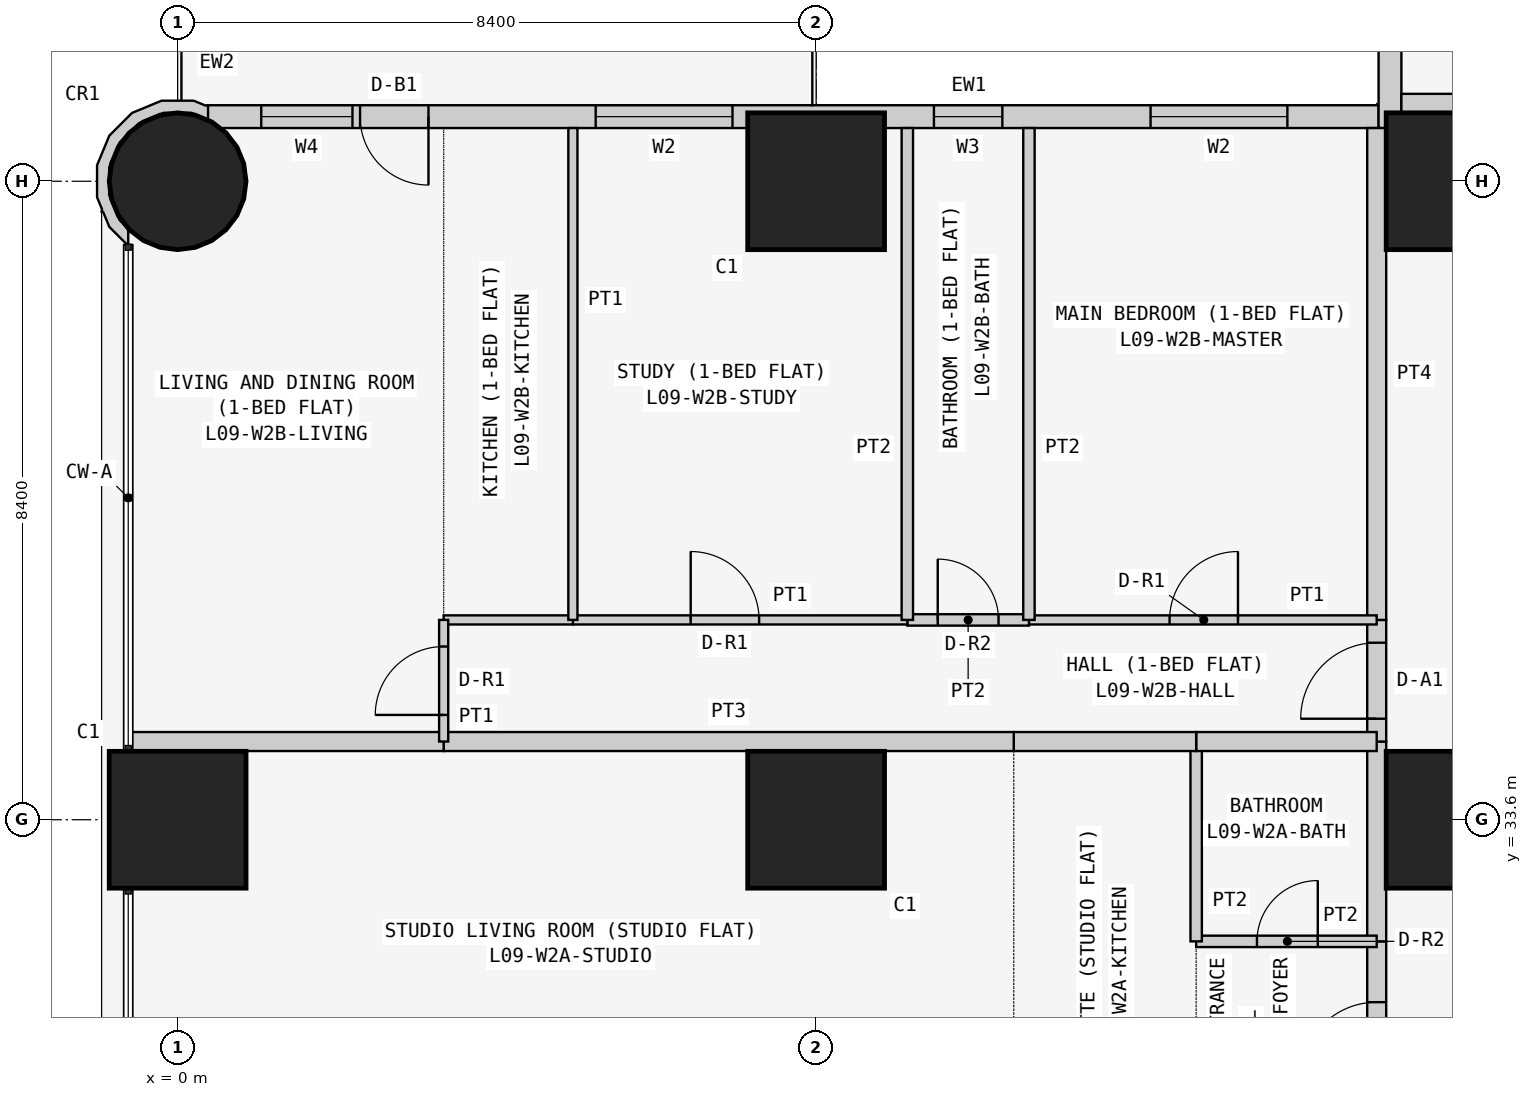
"""IFC4 building model, lengths in metres.
Left out: names, types, materials, properties, quantities, classifications, styles, units other than length and angle.
Written with IfcOpenShell. Run it as: python <this file> out.ifc"""

import sys

from ifc_helpers import new_model, si_unit, direction, frame, frame_2d, origin, origin_2d, place, context, subcontext, project, spatial, polyline, rectangle, circle, outline, extrude, element, fill, save


model = new_model("IFC4")
c1 = context("Model", 3, precision=1e-05, world=origin(), true_north=direction((0.0, 1.0)))
c2 = subcontext(c1, "Body", "Model", "MODEL_VIEW")
j1 = project(units=[si_unit("LENGTHUNIT", "METRE"), si_unit("PLANEANGLEUNIT", "RADIAN")], contexts=[c1])
p1 = place(None, origin())
s1 = spatial("IfcSite", under=j1, at=p1, CompositionType="ELEMENT")
p2 = place(p1, origin())
s2 = spatial("IfcBuilding", under=s1, at=p2, CompositionType="ELEMENT")
p3 = place(p2, frame((0.0, 0.0, 41.7)))
s3 = spatial("IfcBuildingStorey", under=s2, at=p3, CompositionType="ELEMENT", Elevation=41.7)
p4 = place(p3, frame((0.0, 33.6, 0.0), z_axis=(0.0, 0.0, 1.0), x_axis=(1.0, 0.0, 0.0)))
e1 = element("IfcColumn", 1, at=p4, inside=s3, PredefinedType="COLUMN", context=c2, shape_type="SweptSolid", body=[
    extrude(rectangle(XDim=1.8, YDim=1.8, at=origin_2d()), origin(), (0.0, 0.0, 1.0), 3.6),
])
p5 = place(p3, frame((0.0, 42.0, 0.0), z_axis=(0.0, 0.0, 1.0), x_axis=(1.0, 0.0, 0.0)))
e2 = element("IfcColumn", 2, at=p5, inside=s3, PredefinedType="COLUMN", context=c2, shape_type="SweptSolid", body=[
    extrude(circle(Radius=0.9, at=origin_2d()), origin(), (0.0, 0.0, 1.0), 3.6),
])
for number, where, z_axis, x_axis in (
    (3, (8.4, 33.6, 0.0), (0.0, 0.0, 1.0), (1.0, 0.0, 0.0)),
    (4, (8.4, 42.0, 0.0), (0.0, 0.0, 1.0), (1.0, 0.0, 0.0)),
    (5, (16.8, 33.6, 0.0), (0.0, 0.0, 1.0), (1.0, 0.0, 0.0)),
    (6, (16.8, 42.0, 0.0), (0.0, 0.0, 1.0), (1.0, 0.0, 0.0)),
):
    element("IfcColumn", number, at=place(p3, frame(where, z_axis=z_axis, x_axis=x_axis)), inside=s3, PredefinedType="COLUMN", context=c2, shape_type="SweptSolid", body=[
        extrude(rectangle(XDim=1.8, YDim=1.8, at=origin_2d()), origin(), (0.0, 0.0, 1.0), 3.6),
    ])
p6 = place(p3, frame((15.8, 42.85, 0.0), z_axis=(0.0, 0.0, 1.0), x_axis=(-1.0, 0.0, 0.0)))
e7 = element("IfcWall", 7, at=p6, inside=s3, PredefinedType="SOLIDWALL", context=c2, shape_type="SweptSolid", body=[
    extrude(rectangle(XDim=15.4, YDim=0.3, at=frame_2d((7.7, 0.0))), origin(), (0.0, 0.0, 1.0), 3.45),
])
p7 = place(p6, frame((1.2, 0.0, 0.9)))
e8 = element("IfcOpeningElement", 8, at=p7, cuts=e7, PredefinedType="OPENING", context=c2, shape_type="SweptSolid", body=[
    extrude(rectangle(XDim=1.8, YDim=1.5, at=frame_2d((0.9, 0.75))), frame((0.0, 0.16, 0.0), z_axis=(0.0, -1.0, 0.0), x_axis=(1.0, 0.0, 0.0)), (0.0, 0.0, 1.0), 0.32),
])
p8 = place(p6, frame((4.95, 0.0, 1.5)))
e9 = element("IfcOpeningElement", 9, at=p8, cuts=e7, PredefinedType="OPENING", context=c2, shape_type="SweptSolid", body=[
    extrude(rectangle(XDim=0.9, YDim=0.7, at=frame_2d((0.45, 0.35))), frame((0.0, 0.16, 0.0), z_axis=(0.0, -1.0, 0.0), x_axis=(1.0, 0.0, 0.0)), (0.0, 0.0, 1.0), 0.32),
])
p9 = place(p6, frame((8.5, 0.0, 0.9)))
e10 = element("IfcOpeningElement", 10, at=p9, cuts=e7, PredefinedType="OPENING", context=c2, shape_type="SweptSolid", body=[
    extrude(rectangle(XDim=1.8, YDim=1.5, at=frame_2d((0.9, 0.75))), frame((0.0, 0.16, 0.0), z_axis=(0.0, -1.0, 0.0), x_axis=(1.0, 0.0, 0.0)), (0.0, 0.0, 1.0), 0.32),
])
p10 = place(p6, frame((12.5, 0.0, 0.0)))
e11 = element("IfcOpeningElement", 11, at=p10, cuts=e7, PredefinedType="OPENING", context=c2, shape_type="SweptSolid", body=[
    extrude(rectangle(XDim=0.9, YDim=2.4, at=frame_2d((0.45, 1.2))), frame((0.0, 0.16, 0.0), z_axis=(0.0, -1.0, 0.0), x_axis=(1.0, 0.0, 0.0)), (0.0, 0.0, 1.0), 0.32),
])
p11 = place(p6, frame((13.5, 0.0, 0.9)))
e12 = element("IfcOpeningElement", 12, at=p11, cuts=e7, PredefinedType="OPENING", context=c2, shape_type="SweptSolid", body=[
    extrude(rectangle(XDim=1.2, YDim=1.5, at=frame_2d((0.6, 0.75))), frame((0.0, 0.16, 0.0), z_axis=(0.0, -1.0, 0.0), x_axis=(1.0, 0.0, 0.0)), (0.0, 0.0, 1.0), 0.32),
])
p12 = place(p3, frame((15.95, 58.4, 0.0), z_axis=(0.0, 0.0, 1.0), x_axis=(0.0, -1.0, 0.0)))
e13 = element("IfcWall", 13, at=p12, inside=s3, PredefinedType="SOLIDWALL", context=c2, shape_type="SweptSolid", body=[
    extrude(rectangle(XDim=15.7, YDim=0.3, at=frame_2d((7.85, 0.0))), origin(), (0.0, 0.0, 1.0), 3.45),
])
p13 = place(p12, frame((12.4, 0.0, 0.9)))
e14 = element("IfcOpeningElement", 14, at=p13, cuts=e13, PredefinedType="OPENING", context=c2, shape_type="SweptSolid", body=[
    extrude(rectangle(XDim=1.8, YDim=1.5, at=frame_2d((0.9, 0.75))), frame((0.0, 0.16, 0.0), z_axis=(0.0, -1.0, 0.0), x_axis=(1.0, 0.0, 0.0)), (0.0, 0.0, 1.0), 0.32),
])
p14 = place(p12, frame((9.55, 0.0, 1.5)))
e15 = element("IfcOpeningElement", 15, at=p14, cuts=e13, PredefinedType="OPENING", context=c2, shape_type="SweptSolid", body=[
    extrude(rectangle(XDim=0.9, YDim=0.7, at=frame_2d((0.45, 0.35))), frame((0.0, 0.16, 0.0), z_axis=(0.0, -1.0, 0.0), x_axis=(1.0, 0.0, 0.0)), (0.0, 0.0, 1.0), 0.32),
])
p15 = place(p12, frame((5.1, 0.0, 0.9)))
e16 = element("IfcOpeningElement", 16, at=p15, cuts=e13, PredefinedType="OPENING", context=c2, shape_type="SweptSolid", body=[
    extrude(rectangle(XDim=1.8, YDim=1.5, at=frame_2d((0.9, 0.75))), frame((0.0, 0.16, 0.0), z_axis=(0.0, -1.0, 0.0), x_axis=(1.0, 0.0, 0.0)), (0.0, 0.0, 1.0), 0.32),
])
p16 = place(p12, frame((2.0, 0.0, 0.0)))
e17 = element("IfcOpeningElement", 17, at=p16, cuts=e13, PredefinedType="OPENING", context=c2, shape_type="SweptSolid", body=[
    extrude(rectangle(XDim=0.9, YDim=2.4, at=frame_2d((0.45, 1.2))), frame((0.0, 0.16, 0.0), z_axis=(0.0, -1.0, 0.0), x_axis=(1.0, 0.0, 0.0)), (0.0, 0.0, 1.0), 0.32),
])
p17 = place(p12, frame((0.7, 0.0, 0.9)))
e18 = element("IfcOpeningElement", 18, at=p17, cuts=e13, PredefinedType="OPENING", context=c2, shape_type="SweptSolid", body=[
    extrude(rectangle(XDim=1.2, YDim=1.5, at=frame_2d((0.6, 0.75))), frame((0.0, 0.16, 0.0), z_axis=(0.0, -1.0, 0.0), x_axis=(1.0, 0.0, 0.0)), (0.0, 0.0, 1.0), 0.32),
])
p18 = place(p3, frame((0.364, 42.91, 0.0), z_axis=(0.0, 0.0, 1.0), x_axis=(-0.926129809145, 0.377204953059, 0.0)))
e19 = element("IfcWall", 19, at=p18, inside=s3, PredefinedType="SOLIDWALL", context=c2, shape_type="SweptSolid", body=[
    extrude(outline(polyline([(0.36, 1.803), (0.509, 1.741), (0.761, 1.486), (0.896, 1.154), (0.894, 0.795), (0.755, 0.465), (0.5, 0.213), (0.168, 0.078), (-0.1, 0.08), (0.001, -0.097), (0.03, -0.08), (0.199, -0.081), (0.589, 0.078), (0.889, 0.374), (1.053, 0.763), (1.055, 1.185), (0.896, 1.575), (0.778, 1.695), (0.769, 1.728), (0.75, 1.723), (0.6, 1.875), (0.295, 2.003), (0.281, 1.998), (0.36, 1.803)])), origin(), (0.0, 0.0, 1.0), 3.45),
])
p19 = place(p3, frame((16.1, 43.025, 0.0), z_axis=(0.0, 0.0, 1.0), x_axis=(1.0, 0.0, 0.0)))
e20 = element("IfcWall", 20, at=p19, inside=s3, PredefinedType="PARTITIONING", context=c2, shape_type="SweptSolid", body=[
    extrude(rectangle(XDim=6.871, YDim=0.25, at=frame_2d((3.436, 0.0))), origin(), (0.0, 0.0, 1.0), 3.45),
])
p20 = place(p3, frame((15.775, 29.4, 0.0), z_axis=(0.0, 0.0, 1.0), x_axis=(0.0, 1.0, 0.0)))
e21 = element("IfcWall", 21, at=p20, inside=s3, PredefinedType="PARTITIONING", context=c2, shape_type="SweptSolid", body=[
    extrude(rectangle(XDim=2.6, YDim=0.25, at=frame_2d((1.3, 0.0))), origin(), (0.0, 0.0, 1.0), 3.45),
])
p21 = place(p20, frame((0.8, 0.0, 0.0)))
e22 = element("IfcOpeningElement", 22, at=p21, cuts=e21, PredefinedType="OPENING", context=c2, shape_type="SweptSolid", body=[
    extrude(rectangle(XDim=1.0, YDim=2.1, at=frame_2d((0.5, 1.05))), frame((0.0, 0.135, 0.0), z_axis=(0.0, -1.0, 0.0), x_axis=(1.0, 0.0, 0.0)), (0.0, 0.0, 1.0), 0.27),
])
p22 = place(p3, frame((15.775, 32.0, 0.0), z_axis=(0.0, 0.0, 1.0), x_axis=(0.0, 1.0, 0.0)))
e23 = element("IfcWall", 23, at=p22, inside=s3, PredefinedType="PARTITIONING", context=c2, shape_type="SweptSolid", body=[
    extrude(rectangle(XDim=2.629, YDim=0.25, at=frame_2d((1.314, 0.0))), origin(), (0.0, 0.0, 1.0), 3.45),
])
p23 = place(p3, frame((15.775, 34.629, 0.0), z_axis=(0.0, 0.0, 1.0), x_axis=(0.0, 1.0, 0.0)))
e24 = element("IfcWall", 24, at=p23, inside=s3, PredefinedType="PARTITIONING", context=c2, shape_type="SweptSolid", body=[
    extrude(rectangle(XDim=1.6, YDim=0.25, at=frame_2d((0.8, 0.0))), origin(), (0.0, 0.0, 1.0), 3.45),
])
p24 = place(p23, frame((0.3, 0.0, 0.0)))
e25 = element("IfcOpeningElement", 25, at=p24, cuts=e24, PredefinedType="OPENING", context=c2, shape_type="SweptSolid", body=[
    extrude(rectangle(XDim=1.0, YDim=2.1, at=frame_2d((0.5, 1.05))), frame((0.0, 0.135, 0.0), z_axis=(0.0, -1.0, 0.0), x_axis=(1.0, 0.0, 0.0)), (0.0, 0.0, 1.0), 0.27),
])
p25 = place(p3, frame((15.775, 36.229, 0.0), z_axis=(0.0, 0.0, 1.0), x_axis=(0.0, 1.0, 0.0)))
e26 = element("IfcWall", 26, at=p25, inside=s3, PredefinedType="PARTITIONING", context=c2, shape_type="SweptSolid", body=[
    extrude(rectangle(XDim=6.471, YDim=0.25, at=frame_2d((3.235, 0.0))), origin(), (0.0, 0.0, 1.0), 3.45),
])
p26 = place(p3, frame((13.4, 32.0, 0.0), z_axis=(0.0, 0.0, 1.0), x_axis=(1.0, 0.0, 0.0)))
e27 = element("IfcWall", 27, at=p26, inside=s3, PredefinedType="PARTITIONING", context=c2, shape_type="SweptSolid", body=[
    extrude(rectangle(XDim=2.375, YDim=0.15, at=frame_2d((1.188, 0.0))), origin(), (0.0, 0.0, 1.0), 3.45),
])
p27 = place(p26, frame((0.8, 0.0, 0.0)))
e28 = element("IfcOpeningElement", 28, at=p27, cuts=e27, PredefinedType="OPENING", context=c2, shape_type="SweptSolid", body=[
    extrude(rectangle(XDim=0.8, YDim=2.1, at=frame_2d((0.4, 1.05))), frame((0.0, 0.085, 0.0), z_axis=(0.0, -1.0, 0.0), x_axis=(1.0, 0.0, 0.0)), (0.0, 0.0, 1.0), 0.17),
])
p28 = place(p3, frame((13.4, 32.0, 0.0), z_axis=(0.0, 0.0, 1.0), x_axis=(0.0, 1.0, 0.0)))
e29 = element("IfcWall", 29, at=p28, inside=s3, PredefinedType="PARTITIONING", context=c2, shape_type="SweptSolid", body=[
    extrude(rectangle(XDim=2.629, YDim=0.15, at=frame_2d((1.314, 0.0))), origin(), (0.0, 0.0, 1.0), 3.45),
])
p29 = place(p3, frame((13.4, 34.629, 0.0), z_axis=(0.0, 0.0, 1.0), x_axis=(1.0, 0.0, 0.0)))
e30 = element("IfcWall", 30, at=p29, inside=s3, PredefinedType="PARTITIONING", context=c2, shape_type="SweptSolid", body=[
    extrude(rectangle(XDim=2.375, YDim=0.25, at=frame_2d((1.188, 0.0))), origin(), (0.0, 0.0, 1.0), 3.45),
])
p30 = place(p3, frame((11.0, 34.629, 0.0), z_axis=(0.0, 0.0, 1.0), x_axis=(1.0, 0.0, 0.0)))
e31 = element("IfcWall", 31, at=p30, inside=s3, PredefinedType="PARTITIONING", context=c2, shape_type="SweptSolid", body=[
    extrude(rectangle(XDim=2.4, YDim=0.25, at=frame_2d((1.2, 0.0))), origin(), (0.0, 0.0, 1.0), 3.45),
])
p31 = place(p3, frame((3.5, 34.629, 0.0), z_axis=(0.0, 0.0, 1.0), x_axis=(1.0, 0.0, 0.0)))
e32 = element("IfcWall", 32, at=p31, inside=s3, PredefinedType="PARTITIONING", context=c2, shape_type="SweptSolid", body=[
    extrude(rectangle(XDim=7.5, YDim=0.25, at=frame_2d((3.75, 0.0))), origin(), (0.0, 0.0, 1.0), 3.45),
])
p32 = place(p3, frame((-0.65, 34.629, 0.0), z_axis=(0.0, 0.0, 1.0), x_axis=(1.0, 0.0, 0.0)))
e33 = element("IfcWall", 33, at=p32, inside=s3, PredefinedType="PARTITIONING", context=c2, shape_type="SweptSolid", body=[
    extrude(rectangle(XDim=4.15, YDim=0.25, at=frame_2d((2.075, 0.0))), origin(), (0.0, 0.0, 1.0), 3.45),
])
p33 = place(p3, frame((11.2, 36.229, 0.0), z_axis=(0.0, 0.0, 1.0), x_axis=(1.0, 0.0, 0.0)))
e34 = element("IfcWall", 34, at=p33, inside=s3, PredefinedType="PARTITIONING", context=c2, shape_type="SweptSolid", body=[
    extrude(rectangle(XDim=4.575, YDim=0.12, at=frame_2d((2.288, 0.0))), origin(), (0.0, 0.0, 1.0), 3.45),
])
p34 = place(p33, frame((1.85, 0.0, 0.0)))
e35 = element("IfcOpeningElement", 35, at=p34, cuts=e34, PredefinedType="OPENING", context=c2, shape_type="SweptSolid", body=[
    extrude(rectangle(XDim=0.9, YDim=2.1, at=frame_2d((0.45, 1.05))), frame((0.0, 0.07, 0.0), z_axis=(0.0, -1.0, 0.0), x_axis=(1.0, 0.0, 0.0)), (0.0, 0.0, 1.0), 0.14),
])
p35 = place(p3, frame((9.6, 36.229, 0.0), z_axis=(0.0, 0.0, 1.0), x_axis=(1.0, 0.0, 0.0)))
e36 = element("IfcWall", 36, at=p35, inside=s3, PredefinedType="PARTITIONING", context=c2, shape_type="SweptSolid", body=[
    extrude(rectangle(XDim=1.6, YDim=0.15, at=frame_2d((0.8, 0.0))), origin(), (0.0, 0.0, 1.0), 3.45),
])
p36 = place(p35, frame((0.4, 0.0, 0.0)))
e37 = element("IfcOpeningElement", 37, at=p36, cuts=e36, PredefinedType="OPENING", context=c2, shape_type="SweptSolid", body=[
    extrude(rectangle(XDim=0.8, YDim=2.1, at=frame_2d((0.4, 1.05))), frame((0.0, 0.085, 0.0), z_axis=(0.0, -1.0, 0.0), x_axis=(1.0, 0.0, 0.0)), (0.0, 0.0, 1.0), 0.17),
])
p37 = place(p3, frame((5.2, 36.229, 0.0), z_axis=(0.0, 0.0, 1.0), x_axis=(1.0, 0.0, 0.0)))
e38 = element("IfcWall", 38, at=p37, inside=s3, PredefinedType="PARTITIONING", context=c2, shape_type="SweptSolid", body=[
    extrude(rectangle(XDim=4.4, YDim=0.12, at=frame_2d((2.2, 0.0))), origin(), (0.0, 0.0, 1.0), 3.45),
])
p38 = place(p37, frame((1.55, 0.0, 0.0)))
e39 = element("IfcOpeningElement", 39, at=p38, cuts=e38, PredefinedType="OPENING", context=c2, shape_type="SweptSolid", body=[
    extrude(rectangle(XDim=0.9, YDim=2.1, at=frame_2d((0.45, 1.05))), frame((0.0, 0.07, 0.0), z_axis=(0.0, -1.0, 0.0), x_axis=(1.0, 0.0, 0.0)), (0.0, 0.0, 1.0), 0.14),
])
p39 = place(p3, frame((3.5, 36.229, 0.0), z_axis=(0.0, 0.0, 1.0), x_axis=(1.0, 0.0, 0.0)))
e40 = element("IfcWall", 40, at=p39, inside=s3, PredefinedType="PARTITIONING", context=c2, shape_type="SweptSolid", body=[
    extrude(rectangle(XDim=1.7, YDim=0.12, at=frame_2d((0.85, 0.0))), origin(), (0.0, 0.0, 1.0), 3.45),
])
p40 = place(p3, frame((3.5, 34.629, 0.0), z_axis=(0.0, 0.0, 1.0), x_axis=(0.0, 1.0, 0.0)))
e41 = element("IfcWall", 41, at=p40, inside=s3, PredefinedType="PARTITIONING", context=c2, shape_type="SweptSolid", body=[
    extrude(rectangle(XDim=1.6, YDim=0.12, at=frame_2d((0.8, 0.0))), origin(), (0.0, 0.0, 1.0), 3.45),
])
p41 = place(p40, frame((0.35, 0.0, 0.0)))
e42 = element("IfcOpeningElement", 42, at=p41, cuts=e41, PredefinedType="OPENING", context=c2, shape_type="SweptSolid", body=[
    extrude(rectangle(XDim=0.9, YDim=2.1, at=frame_2d((0.45, 1.05))), frame((0.0, 0.07, 0.0), z_axis=(0.0, -1.0, 0.0), x_axis=(1.0, 0.0, 0.0)), (0.0, 0.0, 1.0), 0.14),
])
for number, where, z_axis, x_axis in (
    (43, (11.2, 36.229, 0.0), (0.0, 0.0, 1.0), (0.0, 1.0, 0.0)),
    (44, (9.6, 36.229, 0.0), (0.0, 0.0, 1.0), (0.0, 1.0, 0.0)),
):
    element("IfcWall", number, at=place(p3, frame(where, z_axis=z_axis, x_axis=x_axis)), inside=s3, PredefinedType="PARTITIONING", context=c2, shape_type="SweptSolid", body=[
        extrude(rectangle(XDim=6.471, YDim=0.15, at=frame_2d((3.235, 0.0))), origin(), (0.0, 0.0, 1.0), 3.45),
    ])
p42 = place(p3, frame((5.2, 36.229, 0.0), z_axis=(0.0, 0.0, 1.0), x_axis=(0.0, 1.0, 0.0)))
e45 = element("IfcWall", 45, at=p42, inside=s3, PredefinedType="PARTITIONING", context=c2, shape_type="SweptSolid", body=[
    extrude(rectangle(XDim=6.471, YDim=0.12, at=frame_2d((3.235, 0.0))), origin(), (0.0, 0.0, 1.0), 3.45),
])
p43 = place(p7, origin())
e46 = element("IfcWindow", 46, at=p43, inside=s3, PartitioningType="SINGLE_PANEL", PredefinedType="WINDOW", context=c2, shape_type="SweptSolid", body=[
    extrude(rectangle(XDim=1.8, YDim=1.5, at=frame_2d((0.9, 0.75))), frame((0.0, 0.03, 0.0), z_axis=(0.0, -1.0, 0.0), x_axis=(1.0, 0.0, 0.0)), (0.0, 0.0, 1.0), 0.06),
])
fill(e8, e46)
p44 = place(p8, origin())
e47 = element("IfcWindow", 47, at=p44, inside=s3, PartitioningType="SINGLE_PANEL", PredefinedType="WINDOW", context=c2, shape_type="SweptSolid", body=[
    extrude(rectangle(XDim=0.9, YDim=0.7, at=frame_2d((0.45, 0.35))), frame((0.0, 0.03, 0.0), z_axis=(0.0, -1.0, 0.0), x_axis=(1.0, 0.0, 0.0)), (0.0, 0.0, 1.0), 0.06),
])
fill(e9, e47)
p45 = place(p9, origin())
e48 = element("IfcWindow", 48, at=p45, inside=s3, PartitioningType="SINGLE_PANEL", PredefinedType="WINDOW", context=c2, shape_type="SweptSolid", body=[
    extrude(rectangle(XDim=1.8, YDim=1.5, at=frame_2d((0.9, 0.75))), frame((0.0, 0.03, 0.0), z_axis=(0.0, -1.0, 0.0), x_axis=(1.0, 0.0, 0.0)), (0.0, 0.0, 1.0), 0.06),
])
fill(e10, e48)
p46 = place(p10, origin())
e49 = element("IfcDoor", 49, at=p46, inside=s3, OperationType="SINGLE_SWING_LEFT", PredefinedType="DOOR", context=c2, shape_type="SweptSolid", body=[
    extrude(rectangle(XDim=0.9, YDim=2.4, at=frame_2d((0.45, 1.2))), frame((0.0, 0.025, 0.0), z_axis=(0.0, -1.0, 0.0), x_axis=(1.0, 0.0, 0.0)), (0.0, 0.0, 1.0), 0.05),
])
fill(e11, e49)
p47 = place(p11, origin())
e50 = element("IfcWindow", 50, at=p47, inside=s3, PartitioningType="SINGLE_PANEL", PredefinedType="WINDOW", context=c2, shape_type="SweptSolid", body=[
    extrude(rectangle(XDim=1.2, YDim=1.5, at=frame_2d((0.6, 0.75))), frame((0.0, 0.03, 0.0), z_axis=(0.0, -1.0, 0.0), x_axis=(1.0, 0.0, 0.0)), (0.0, 0.0, 1.0), 0.06),
])
fill(e12, e50)
p48 = place(p21, origin())
e51 = element("IfcDoor", 51, at=p48, inside=s3, OperationType="SINGLE_SWING_LEFT", PredefinedType="DOOR", context=c2, shape_type="SweptSolid", body=[
    extrude(rectangle(XDim=1.0, YDim=2.1, at=frame_2d((0.5, 1.05))), frame((0.0, 0.025, 0.0), z_axis=(0.0, -1.0, 0.0), x_axis=(1.0, 0.0, 0.0)), (0.0, 0.0, 1.0), 0.05),
])
fill(e22, e51)
p49 = place(p27, origin())
e52 = element("IfcDoor", 52, at=p49, inside=s3, OperationType="SINGLE_SWING_RIGHT", PredefinedType="DOOR", context=c2, shape_type="SweptSolid", body=[
    extrude(rectangle(XDim=0.8, YDim=2.1, at=frame_2d((0.4, 1.05))), frame((0.0, 0.025, 0.0), z_axis=(0.0, -1.0, 0.0), x_axis=(1.0, 0.0, 0.0)), (0.0, 0.0, 1.0), 0.05),
])
fill(e28, e52)
p50 = place(p24, origin())
e53 = element("IfcDoor", 53, at=p50, inside=s3, OperationType="SINGLE_SWING_LEFT", PredefinedType="DOOR", context=c2, shape_type="SweptSolid", body=[
    extrude(rectangle(XDim=1.0, YDim=2.1, at=frame_2d((0.5, 1.05))), frame((0.0, 0.025, 0.0), z_axis=(0.0, -1.0, 0.0), x_axis=(1.0, 0.0, 0.0)), (0.0, 0.0, 1.0), 0.05),
])
fill(e25, e53)
p51 = place(p34, origin())
e54 = element("IfcDoor", 54, at=p51, inside=s3, OperationType="SINGLE_SWING_RIGHT", PredefinedType="DOOR", context=c2, shape_type="SweptSolid", body=[
    extrude(rectangle(XDim=0.9, YDim=2.1, at=frame_2d((0.45, 1.05))), frame((0.0, 0.025, 0.0), z_axis=(0.0, -1.0, 0.0), x_axis=(1.0, 0.0, 0.0)), (0.0, 0.0, 1.0), 0.05),
])
fill(e35, e54)
p52 = place(p36, origin())
e55 = element("IfcDoor", 55, at=p52, inside=s3, OperationType="SINGLE_SWING_LEFT", PredefinedType="DOOR", context=c2, shape_type="SweptSolid", body=[
    extrude(rectangle(XDim=0.8, YDim=2.1, at=frame_2d((0.4, 1.05))), frame((0.0, 0.025, 0.0), z_axis=(0.0, -1.0, 0.0), x_axis=(1.0, 0.0, 0.0)), (0.0, 0.0, 1.0), 0.05),
])
fill(e37, e55)
p53 = place(p38, origin())
e56 = element("IfcDoor", 56, at=p53, inside=s3, OperationType="SINGLE_SWING_LEFT", PredefinedType="DOOR", context=c2, shape_type="SweptSolid", body=[
    extrude(rectangle(XDim=0.9, YDim=2.1, at=frame_2d((0.45, 1.05))), frame((0.0, 0.025, 0.0), z_axis=(0.0, -1.0, 0.0), x_axis=(1.0, 0.0, 0.0)), (0.0, 0.0, 1.0), 0.05),
])
fill(e39, e56)
p54 = place(p41, origin())
e57 = element("IfcDoor", 57, at=p54, inside=s3, OperationType="SINGLE_SWING_LEFT", PredefinedType="DOOR", context=c2, shape_type="SweptSolid", body=[
    extrude(rectangle(XDim=0.9, YDim=2.1, at=frame_2d((0.45, 1.05))), frame((0.0, 0.025, 0.0), z_axis=(0.0, -1.0, 0.0), x_axis=(1.0, 0.0, 0.0)), (0.0, 0.0, 1.0), 0.05),
])
fill(e42, e57)
save(model, sys.argv[1])
